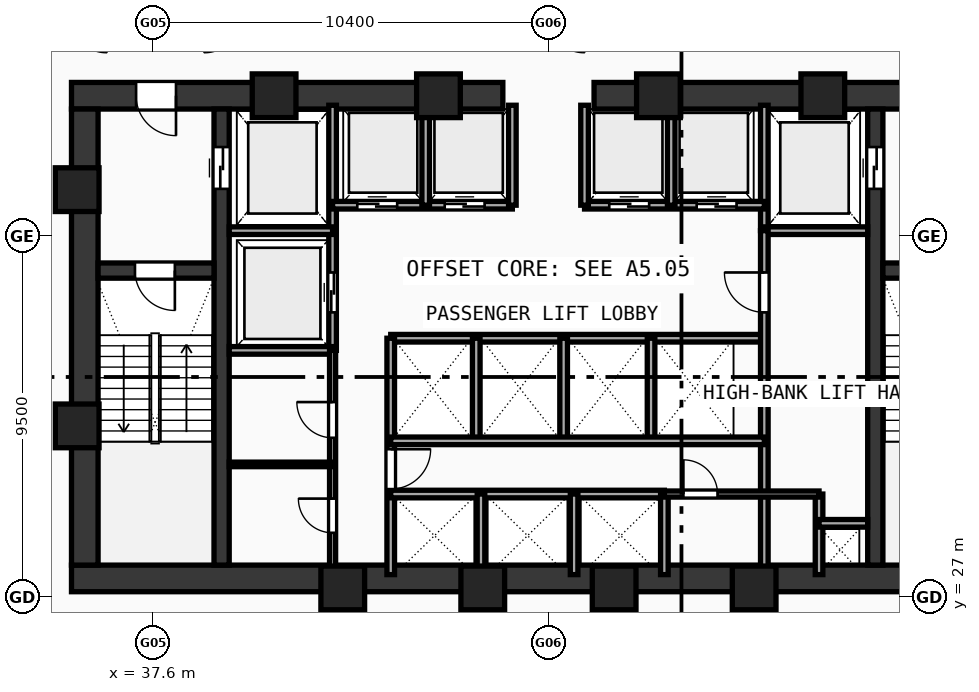
"""IFC4 building model, lengths in metres.
Left out: names, types, materials, properties, quantities, classifications, styles, units other than length and angle.
Written with IfcOpenShell. Run it as: python <this file> out.ifc"""

import sys

from ifc_helpers import new_model, si_unit, direction, frame, frame_2d, origin, origin_with_axes, origin_2d, place, context, subcontext, project, spatial, rectangle, hollow_rectangle, extrude, source, transform, mapped, element, fill, save


model = new_model("IFC4")
c1 = context("Model", 3, precision=1e-05, world=origin(), true_north=direction((0.0, 1.0)))
c2 = subcontext(c1, "Body", "Model", "MODEL_VIEW")
j1 = project(units=[si_unit("LENGTHUNIT", "METRE"), si_unit("PLANEANGLEUNIT", "RADIAN")], contexts=[c1])
p1 = place(None, origin())
s1 = spatial("IfcSite", under=j1, at=p1, CompositionType="ELEMENT")
p2 = place(p1, origin())
s2 = spatial("IfcBuilding", under=s1, at=p2, CompositionType="ELEMENT")
p3 = place(p2, frame((0.0, 0.0, 48.55)))
s3 = spatial("IfcBuildingStorey", under=s2, at=p3, CompositionType="ELEMENT", Elevation=48.55)
p4 = place(p3, frame((35.45, 27.5, 0.0), z_axis=(0.0, 0.0, 1.0), x_axis=(1.0, 0.0, 0.0)))
e1 = element("IfcWall", 1, at=p4, inside=s3, PredefinedType="SHEAR", context=c2, shape_type="SweptSolid", body=[
    extrude(rectangle(XDim=25.1, YDim=0.7, at=frame_2d((12.55, 0.0))), origin(), (0.0, 0.0, 1.0), 3.37),
])
p5 = place(p3, frame((35.45, 40.2, 0.0), z_axis=(0.0, 0.0, 1.0), x_axis=(1.0, 0.0, 0.0)))
e2 = element("IfcWall", 2, at=p5, inside=s3, PredefinedType="SHEAR", context=c2, shape_type="SweptSolid", body=[
    extrude(rectangle(XDim=11.35, YDim=0.7, at=frame_2d((5.675, 0.0))), origin(), (0.0, 0.0, 1.0), 3.37),
])
p6 = place(p5, frame((1.7, 0.0, 0.0)))
e3 = element("IfcOpeningElement", 3, at=p6, cuts=e2, PredefinedType="OPENING", context=c2, shape_type="SweptSolid", body=[
    extrude(rectangle(XDim=1.05, YDim=2.1, at=frame_2d((0.525, 1.05))), frame((0.0, 0.36, 0.0), z_axis=(0.0, -1.0, 0.0), x_axis=(1.0, 0.0, 0.0)), (0.0, 0.0, 1.0), 0.72),
])
p7 = place(p3, frame((49.2, 40.2, 0.0), z_axis=(0.0, 0.0, 1.0), x_axis=(1.0, 0.0, 0.0)))
e4 = element("IfcWall", 4, at=p7, inside=s3, PredefinedType="SHEAR", context=c2, shape_type="SweptSolid", body=[
    extrude(rectangle(XDim=11.35, YDim=0.7, at=frame_2d((5.675, 0.0))), origin(), (0.0, 0.0, 1.0), 3.37),
])
p8 = place(p7, frame((8.6, 0.0, 0.0)))
e5 = element("IfcOpeningElement", 5, at=p8, cuts=e4, PredefinedType="OPENING", context=c2, shape_type="SweptSolid", body=[
    extrude(rectangle(XDim=1.05, YDim=2.1, at=frame_2d((0.525, 1.05))), frame((0.0, 0.36, 0.0), z_axis=(0.0, -1.0, 0.0), x_axis=(1.0, 0.0, 0.0)), (0.0, 0.0, 1.0), 0.72),
])
p9 = place(p3, frame((35.8, 27.85, 0.0), z_axis=(0.0, 0.0, 1.0), x_axis=(0.0, 1.0, 0.0)))
e6 = element("IfcWall", 6, at=p9, inside=s3, PredefinedType="SHEAR", context=c2, shape_type="SweptSolid", body=[
    extrude(rectangle(XDim=12.0, YDim=0.7, at=frame_2d((6.0, 0.0))), origin(), (0.0, 0.0, 1.0), 3.37),
])
p10 = place(p3, frame((39.4, 27.85, 0.0), z_axis=(0.0, 0.0, 1.0), x_axis=(0.0, 1.0, 0.0)))
e7 = element("IfcWall", 7, at=p10, inside=s3, PredefinedType="SHEAR", context=c2, shape_type="SweptSolid", body=[
    extrude(rectangle(XDim=12.0, YDim=0.4, at=frame_2d((6.0, 0.0))), origin(), (0.0, 0.0, 1.0), 3.37),
])
p11 = place(p10, frame((9.9, 0.0, 0.0)))
e8 = element("IfcOpeningElement", 8, at=p11, cuts=e7, PredefinedType="OPENING", context=c2, shape_type="SweptSolid", body=[
    extrude(rectangle(XDim=1.1, YDim=2.1, at=frame_2d((0.55, 1.05))), frame((0.0, 0.21, 0.0), z_axis=(0.0, -1.0, 0.0), x_axis=(1.0, 0.0, 0.0)), (0.0, 0.0, 1.0), 0.42),
])
p12 = place(p3, frame((56.6, 27.85, 0.0), z_axis=(0.0, 0.0, 1.0), x_axis=(0.0, 1.0, 0.0)))
e9 = element("IfcWall", 9, at=p12, inside=s3, PredefinedType="SHEAR", context=c2, shape_type="SweptSolid", body=[
    extrude(rectangle(XDim=12.0, YDim=0.4, at=frame_2d((6.0, 0.0))), origin(), (0.0, 0.0, 1.0), 3.37),
])
p13 = place(p12, frame((9.9, 0.0, 0.0)))
e10 = element("IfcOpeningElement", 10, at=p13, cuts=e9, PredefinedType="OPENING", context=c2, shape_type="SweptSolid", body=[
    extrude(rectangle(XDim=1.1, YDim=2.1, at=frame_2d((0.55, 1.05))), frame((0.0, 0.21, 0.0), z_axis=(0.0, -1.0, 0.0), x_axis=(1.0, 0.0, 0.0)), (0.0, 0.0, 1.0), 0.42),
])
p14 = place(p3, frame((36.15, 35.6, 0.0), z_axis=(0.0, 0.0, 1.0), x_axis=(1.0, 0.0, 0.0)))
e11 = element("IfcWall", 11, at=p14, inside=s3, PredefinedType="SHEAR", context=c2, shape_type="SweptSolid", body=[
    extrude(rectangle(XDim=3.05, YDim=0.4, at=frame_2d((1.525, 0.0))), origin(), (0.0, 0.0, 1.0), 3.37),
])
p15 = place(p14, frame((0.97, 0.0, 0.0)))
e12 = element("IfcOpeningElement", 12, at=p15, cuts=e11, PredefinedType="OPENING", context=c2, shape_type="SweptSolid", body=[
    extrude(rectangle(XDim=1.05, YDim=2.1, at=frame_2d((0.525, 1.05))), frame((0.0, 0.21, 0.0), z_axis=(0.0, -1.0, 0.0), x_axis=(1.0, 0.0, 0.0)), (0.0, 0.0, 1.0), 0.42),
])
p16 = place(p3, frame((56.8, 35.6, 0.0), z_axis=(0.0, 0.0, 1.0), x_axis=(1.0, 0.0, 0.0)))
e13 = element("IfcWall", 13, at=p16, inside=s3, PredefinedType="SHEAR", context=c2, shape_type="SweptSolid", body=[
    extrude(rectangle(XDim=3.05, YDim=0.4, at=frame_2d((1.525, 0.0))), origin(), (0.0, 0.0, 1.0), 3.37),
])
p17 = place(p16, frame((1.02, 0.0, 0.0)))
e14 = element("IfcOpeningElement", 14, at=p17, cuts=e13, PredefinedType="OPENING", context=c2, shape_type="SweptSolid", body=[
    extrude(rectangle(XDim=1.05, YDim=2.1, at=frame_2d((0.525, 1.05))), frame((0.0, 0.21, 0.0), z_axis=(0.0, -1.0, 0.0), x_axis=(1.0, 0.0, 0.0)), (0.0, 0.0, 1.0), 0.42),
])
m1 = source(origin(), c2, "Body", "SweptSolid", [
    extrude(hollow_rectangle(XDim=1.15, YDim=1.15, WallThickness=0.048, at=origin_2d()), origin(), (0.0, 0.0, 1.0), 3.63),
])
for number, where, z_axis, x_axis in (
    (15, (42.588, 27.25, -0.26), (0.0, 0.0, 1.0), (1.0, 0.0, 0.0)),
    (16, (46.272, 27.25, -0.26), (0.0, 0.0, 1.0), (1.0, 0.0, 0.0)),
    (17, (49.729, 27.25, -0.26), (0.0, 0.0, 1.0), (1.0, 0.0, 0.0)),
    (18, (53.412, 27.25, -0.26), (0.0, 0.0, 1.0), (1.0, 0.0, 0.0)),
    (19, (55.219, 40.2, -0.26), (0.0, 0.0, 1.0), (1.0, 0.0, 0.0)),
    (20, (50.894, 40.2, -0.26), (0.0, 0.0, 1.0), (1.0, 0.0, 0.0)),
    (21, (45.106, 40.2, -0.26), (0.0, 0.0, 1.0), (1.0, 0.0, 0.0)),
    (22, (40.781, 40.2, -0.26), (0.0, 0.0, 1.0), (1.0, 0.0, 0.0)),
    (23, (35.6, 37.729, -0.26), (0.0, 0.0, 1.0), (1.0, 0.0, 0.0)),
    (24, (35.6, 31.513, -0.26), (0.0, 0.0, 1.0), (1.0, 0.0, 0.0)),
):
    element("IfcColumn", number, at=place(p3, frame(where, z_axis=z_axis, x_axis=x_axis)), inside=s3, PredefinedType="COLUMN", context=c2, shape_type="MappedRepresentation", body=[
        mapped(m1, transform((0.0, 0.0, 0.0), scale=1.0)),
    ])
p18 = place(p3, frame((42.32, 33.5, 0.0), z_axis=(0.0, 0.0, 1.0), x_axis=(0.0, 1.0, 0.0)))
e25 = element("IfcWall", 25, at=p18, inside=s3, PredefinedType="SOLIDWALL", context=c2, shape_type="SweptSolid", body=[
    extrude(rectangle(XDim=6.45, YDim=0.2, at=frame_2d((3.225, 0.0))), origin(), (0.0, 0.0, 1.0), 3.37),
])
p19 = place(p18, frame((1.0, 0.0, 0.0)))
e26 = element("IfcOpeningElement", 26, at=p19, cuts=e25, PredefinedType="OPENING", context=c2, shape_type="SweptSolid", body=[
    extrude(rectangle(XDim=1.05, YDim=2.1, at=frame_2d((0.525, 1.05))), frame((0.0, 0.11, 0.0), z_axis=(0.0, -1.0, 0.0), x_axis=(1.0, 0.0, 0.0)), (0.0, 0.0, 1.0), 0.22),
])
for number, where, z_axis, x_axis in (
    (27, (39.6, 36.65, 0.0), (0.0, 0.0, 1.0), (1.0, 0.0, 0.0)),
    (28, (39.6, 33.5, 0.0), (0.0, 0.0, 1.0), (1.0, 0.0, 0.0)),
):
    element("IfcWall", number, at=place(p3, frame(where, z_axis=z_axis, x_axis=x_axis)), inside=s3, PredefinedType="SOLIDWALL", context=c2, shape_type="SweptSolid", body=[
        extrude(rectangle(XDim=2.72, YDim=0.2, at=frame_2d((1.36, 0.0))), origin(), (0.0, 0.0, 1.0), 3.37),
    ])
p20 = place(p3, frame((53.68, 36.65, 0.0), z_axis=(0.0, 0.0, 1.0), x_axis=(0.0, 1.0, 0.0)))
e29 = element("IfcWall", 29, at=p20, inside=s3, PredefinedType="SOLIDWALL", context=c2, shape_type="SweptSolid", body=[
    extrude(rectangle(XDim=3.3, YDim=0.2, at=frame_2d((1.65, 0.0))), origin(), (0.0, 0.0, 1.0), 3.37),
])
p21 = place(p3, frame((53.68, 36.65, 0.0), z_axis=(0.0, 0.0, 1.0), x_axis=(1.0, 0.0, 0.0)))
e30 = element("IfcWall", 30, at=p21, inside=s3, PredefinedType="SOLIDWALL", context=c2, shape_type="SweptSolid", body=[
    extrude(rectangle(XDim=2.72, YDim=0.2, at=frame_2d((1.36, 0.0))), origin(), (0.0, 0.0, 1.0), 3.37),
])
p22 = place(p3, frame((42.32, 37.32, 0.0), z_axis=(0.0, 0.0, 1.0), x_axis=(1.0, 0.0, 0.0)))
e31 = element("IfcWall", 31, at=p22, inside=s3, PredefinedType="SOLIDWALL", context=c2, shape_type="SweptSolid", body=[
    extrude(rectangle(XDim=4.73, YDim=0.2, at=frame_2d((2.365, 0.0))), origin(), (0.0, 0.0, 1.0), 3.37),
])
p23 = place(p22, frame((0.65, 0.0, 0.0)))
e32 = element("IfcOpeningElement", 32, at=p23, cuts=e31, PredefinedType="OPENING", context=c2, shape_type="SweptSolid", body=[
    extrude(rectangle(XDim=1.05, YDim=2.1, at=frame_2d((0.525, 1.05))), frame((0.0, 0.11, 0.0), z_axis=(0.0, -1.0, 0.0), x_axis=(1.0, 0.0, 0.0)), (0.0, 0.0, 1.0), 0.22),
])
p24 = place(p22, frame((2.95, 0.0, 0.0)))
e33 = element("IfcOpeningElement", 33, at=p24, cuts=e31, PredefinedType="OPENING", context=c2, shape_type="SweptSolid", body=[
    extrude(rectangle(XDim=1.05, YDim=2.1, at=frame_2d((0.525, 1.05))), frame((0.0, 0.11, 0.0), z_axis=(0.0, -1.0, 0.0), x_axis=(1.0, 0.0, 0.0)), (0.0, 0.0, 1.0), 0.22),
])
p25 = place(p3, frame((48.95, 37.32, 0.0), z_axis=(0.0, 0.0, 1.0), x_axis=(1.0, 0.0, 0.0)))
e34 = element("IfcWall", 34, at=p25, inside=s3, PredefinedType="SOLIDWALL", context=c2, shape_type="SweptSolid", body=[
    extrude(rectangle(XDim=4.73, YDim=0.2, at=frame_2d((2.365, 0.0))), origin(), (0.0, 0.0, 1.0), 3.37),
])
p26 = place(p25, frame((0.65, 0.0, 0.0)))
e35 = element("IfcOpeningElement", 35, at=p26, cuts=e34, PredefinedType="OPENING", context=c2, shape_type="SweptSolid", body=[
    extrude(rectangle(XDim=1.05, YDim=2.1, at=frame_2d((0.525, 1.05))), frame((0.0, 0.11, 0.0), z_axis=(0.0, -1.0, 0.0), x_axis=(1.0, 0.0, 0.0)), (0.0, 0.0, 1.0), 0.22),
])
p27 = place(p25, frame((2.95, 0.0, 0.0)))
e36 = element("IfcOpeningElement", 36, at=p27, cuts=e34, PredefinedType="OPENING", context=c2, shape_type="SweptSolid", body=[
    extrude(rectangle(XDim=1.05, YDim=2.1, at=frame_2d((0.525, 1.05))), frame((0.0, 0.11, 0.0), z_axis=(0.0, -1.0, 0.0), x_axis=(1.0, 0.0, 0.0)), (0.0, 0.0, 1.0), 0.22),
])
for number, where, z_axis, x_axis in (
    (37, (47.05, 37.32, 0.0), (0.0, 0.0, 1.0), (0.0, 1.0, 0.0)),
    (38, (48.95, 37.32, 0.0), (0.0, 0.0, 1.0), (0.0, 1.0, 0.0)),
    (39, (44.77, 37.32, 0.0), (0.0, 0.0, 1.0), (0.0, 1.0, 0.0)),
    (40, (51.23, 37.32, 0.0), (0.0, 0.0, 1.0), (0.0, 1.0, 0.0)),
):
    element("IfcWall", number, at=place(p3, frame(where, z_axis=z_axis, x_axis=x_axis)), inside=s3, PredefinedType="SOLIDWALL", context=c2, shape_type="SweptSolid", body=[
        extrude(rectangle(XDim=2.63, YDim=0.2, at=frame_2d((1.315, 0.0))), origin(), (0.0, 0.0, 1.0), 3.37),
    ])
p28 = place(p3, frame((43.85, 33.82, 0.0), z_axis=(0.0, 0.0, 1.0), x_axis=(1.0, 0.0, 0.0)))
e41 = element("IfcWall", 41, at=p28, inside=s3, PredefinedType="SOLIDWALL", context=c2, shape_type="SweptSolid", body=[
    extrude(rectangle(XDim=9.83, YDim=0.2, at=frame_2d((4.915, 0.0))), origin(), (0.0, 0.0, 1.0), 3.37),
])
p29 = place(p3, frame((43.85, 27.6, 0.0), z_axis=(0.0, 0.0, 1.0), x_axis=(0.0, 1.0, 0.0)))
e42 = element("IfcWall", 42, at=p29, inside=s3, PredefinedType="SOLIDWALL", context=c2, shape_type="SweptSolid", body=[
    extrude(rectangle(XDim=6.22, YDim=0.2, at=frame_2d((3.11, 0.0))), origin(), (0.0, 0.0, 1.0), 3.37),
])
p30 = place(p29, frame((2.25, 0.0, 0.0)))
e43 = element("IfcOpeningElement", 43, at=p30, cuts=e42, PredefinedType="OPENING", context=c2, shape_type="SweptSolid", body=[
    extrude(rectangle(XDim=1.05, YDim=2.1, at=frame_2d((0.525, 1.05))), frame((0.0, 0.11, 0.0), z_axis=(0.0, -1.0, 0.0), x_axis=(1.0, 0.0, 0.0)), (0.0, 0.0, 1.0), 0.22),
])
p31 = place(p3, frame((53.68, 27.6, 0.0), z_axis=(0.0, 0.0, 1.0), x_axis=(0.0, 1.0, 0.0)))
e44 = element("IfcWall", 44, at=p31, inside=s3, PredefinedType="SOLIDWALL", context=c2, shape_type="SweptSolid", body=[
    extrude(rectangle(XDim=9.05, YDim=0.2, at=frame_2d((4.525, 0.0))), origin(), (0.0, 0.0, 1.0), 3.37),
])
p32 = place(p31, frame((6.9, 0.0, 0.0)))
e45 = element("IfcOpeningElement", 45, at=p32, cuts=e44, PredefinedType="OPENING", context=c2, shape_type="SweptSolid", body=[
    extrude(rectangle(XDim=1.05, YDim=2.1, at=frame_2d((0.525, 1.05))), frame((0.0, 0.11, 0.0), z_axis=(0.0, -1.0, 0.0), x_axis=(1.0, 0.0, 0.0)), (0.0, 0.0, 1.0), 0.22),
])
for number, where, z_axis, x_axis in (
    (46, (46.1, 31.12, 0.0), (0.0, 0.0, 1.0), (0.0, 1.0, 0.0)),
    (47, (48.4, 31.12, 0.0), (0.0, 0.0, 1.0), (0.0, 1.0, 0.0)),
    (48, (50.7, 31.12, 0.0), (0.0, 0.0, 1.0), (0.0, 1.0, 0.0)),
):
    element("IfcWall", number, at=place(p3, frame(where, z_axis=z_axis, x_axis=x_axis)), inside=s3, PredefinedType="SOLIDWALL", context=c2, shape_type="SweptSolid", body=[
        extrude(rectangle(XDim=2.7, YDim=0.2, at=frame_2d((1.35, 0.0))), origin(), (0.0, 0.0, 1.0), 3.37),
    ])
p33 = place(p3, frame((43.85, 29.72, 0.0), z_axis=(0.0, 0.0, 1.0), x_axis=(1.0, 0.0, 0.0)))
e49 = element("IfcWall", 49, at=p33, inside=s3, PredefinedType="SOLIDWALL", context=c2, shape_type="SweptSolid", body=[
    extrude(rectangle(XDim=7.2, YDim=0.2, at=frame_2d((3.6, 0.0))), origin(), (0.0, 0.0, 1.0), 3.37),
])
p34 = place(p3, frame((51.05, 27.6, 0.0), z_axis=(0.0, 0.0, 1.0), x_axis=(0.0, 1.0, 0.0)))
e50 = element("IfcWall", 50, at=p34, inside=s3, PredefinedType="SOLIDWALL", context=c2, shape_type="SweptSolid", body=[
    extrude(rectangle(XDim=2.12, YDim=0.2, at=frame_2d((1.06, 0.0))), origin(), (0.0, 0.0, 1.0), 3.37),
])
p35 = place(p3, frame((43.85, 31.12, 0.0), z_axis=(0.0, 0.0, 1.0), x_axis=(1.0, 0.0, 0.0)))
e51 = element("IfcWall", 51, at=p35, inside=s3, PredefinedType="SOLIDWALL", context=c2, shape_type="SweptSolid", body=[
    extrude(rectangle(XDim=9.83, YDim=0.2, at=frame_2d((4.915, 0.0))), origin(), (0.0, 0.0, 1.0), 3.37),
])
for number, where, z_axis, x_axis in (
    (52, (46.225, 27.6, 0.0), (0.0, 0.0, 1.0), (0.0, 1.0, 0.0)),
    (53, (48.675, 27.6, 0.0), (0.0, 0.0, 1.0), (0.0, 1.0, 0.0)),
    (54, (55.12, 27.6, 0.0), (0.0, 0.0, 1.0), (0.0, 1.0, 0.0)),
):
    element("IfcWall", number, at=place(p3, frame(where, z_axis=z_axis, x_axis=x_axis)), inside=s3, PredefinedType="SOLIDWALL", context=c2, shape_type="SweptSolid", body=[
        extrude(rectangle(XDim=2.12, YDim=0.2, at=frame_2d((1.06, 0.0))), origin(), (0.0, 0.0, 1.0), 3.37),
    ])
p36 = place(p3, frame((55.12, 28.95, 0.0), z_axis=(0.0, 0.0, 1.0), x_axis=(1.0, 0.0, 0.0)))
e55 = element("IfcWall", 55, at=p36, inside=s3, PredefinedType="SOLIDWALL", context=c2, shape_type="SweptSolid", body=[
    extrude(rectangle(XDim=1.28, YDim=0.2, at=frame_2d((0.64, 0.0))), origin(), (0.0, 0.0, 1.0), 3.37),
])
p37 = place(p3, frame((42.32, 27.6, 0.0), z_axis=(0.0, 0.0, 1.0), x_axis=(0.0, 1.0, 0.0)))
e56 = element("IfcWall", 56, at=p37, inside=s3, PredefinedType="PARTITIONING", context=c2, shape_type="SweptSolid", body=[
    extrude(rectangle(XDim=5.9, YDim=0.16, at=frame_2d((2.95, 0.0))), origin(), (0.0, 0.0, 1.0), 3.37),
])
p38 = place(p37, frame((1.1, 0.0, 0.0)))
e57 = element("IfcOpeningElement", 57, at=p38, cuts=e56, PredefinedType="OPENING", context=c2, shape_type="SweptSolid", body=[
    extrude(rectangle(XDim=0.9, YDim=2.1, at=frame_2d((0.45, 1.05))), frame((0.0, 0.09, 0.0), z_axis=(0.0, -1.0, 0.0), x_axis=(1.0, 0.0, 0.0)), (0.0, 0.0, 1.0), 0.18),
])
p39 = place(p37, frame((3.6, 0.0, 0.0)))
e58 = element("IfcOpeningElement", 58, at=p39, cuts=e56, PredefinedType="OPENING", context=c2, shape_type="SweptSolid", body=[
    extrude(rectangle(XDim=0.94, YDim=2.1, at=frame_2d((0.47, 1.05))), frame((0.0, 0.09, 0.0), z_axis=(0.0, -1.0, 0.0), x_axis=(1.0, 0.0, 0.0)), (0.0, 0.0, 1.0), 0.18),
])
p40 = place(p3, frame((51.05, 29.72, 0.0), z_axis=(0.0, 0.0, 1.0), x_axis=(1.0, 0.0, 0.0)))
e59 = element("IfcWall", 59, at=p40, inside=s3, PredefinedType="PARTITIONING", context=c2, shape_type="SweptSolid", body=[
    extrude(rectangle(XDim=4.07, YDim=0.16, at=frame_2d((2.035, 0.0))), origin(), (0.0, 0.0, 1.0), 3.37),
])
p41 = place(p40, frame((0.5, 0.0, 0.0)))
e60 = element("IfcOpeningElement", 60, at=p41, cuts=e59, PredefinedType="OPENING", context=c2, shape_type="SweptSolid", body=[
    extrude(rectangle(XDim=0.9, YDim=2.1, at=frame_2d((0.45, 1.05))), frame((0.0, 0.09, 0.0), z_axis=(0.0, -1.0, 0.0), x_axis=(1.0, 0.0, 0.0)), (0.0, 0.0, 1.0), 0.18),
])
p42 = place(p3, frame((39.6, 30.5, 0.0), z_axis=(0.0, 0.0, 1.0), x_axis=(1.0, 0.0, 0.0)))
e61 = element("IfcWall", 61, at=p42, inside=s3, PredefinedType="PARTITIONING", context=c2, shape_type="SweptSolid", body=[
    extrude(rectangle(XDim=2.72, YDim=0.12, at=frame_2d((1.36, 0.0))), origin(), (0.0, 0.0, 1.0), 3.37),
])
m2 = source(origin(), c2, "Body", "SweptSolid", [
    extrude(rectangle(XDim=1.05, YDim=2.1, at=frame_2d((0.525, 1.05))), frame((0.0, 0.025, 0.0), z_axis=(0.0, -1.0, 0.0), x_axis=(1.0, 0.0, 0.0)), (0.0, 0.0, 1.0), 0.05),
])
p43 = place(p15, frame((1.05, 0.0, 0.0), z_axis=(0.0, 0.0, 1.0), x_axis=(-1.0, 0.0, 0.0)))
e62 = element("IfcDoor", 62, at=p43, inside=s3, OperationType="SINGLE_SWING_LEFT", PredefinedType="DOOR", context=c2, shape_type="MappedRepresentation", body=[
    mapped(m2, transform((0.0, 0.0, 0.0), scale=1.0)),
])
fill(e12, e62)
p44 = place(p6, frame((1.05, 0.0, 0.0), z_axis=(0.0, 0.0, 1.0), x_axis=(-1.0, 0.0, 0.0)))
e63 = element("IfcDoor", 63, at=p44, inside=s3, OperationType="SINGLE_SWING_LEFT", PredefinedType="DOOR", context=c2, shape_type="MappedRepresentation", body=[
    mapped(m2, transform((0.0, 0.0, 0.0), scale=1.0)),
])
fill(e3, e63)
m3 = source(origin(), c2, "Body", "SweptSolid", [
    extrude(rectangle(XDim=1.1, YDim=2.1, at=frame_2d((0.55, 1.05))), frame((0.0, 0.025, 0.0), z_axis=(0.0, -1.0, 0.0), x_axis=(1.0, 0.0, 0.0)), (0.0, 0.0, 1.0), 0.05),
])
p45 = place(p11, frame((1.1, 0.0, 0.0), z_axis=(0.0, 0.0, 1.0), x_axis=(-1.0, 0.0, 0.0)))
e64 = element("IfcDoor", 64, at=p45, inside=s3, OperationType="DOUBLE_DOOR_SLIDING", PredefinedType="DOOR", context=c2, shape_type="MappedRepresentation", body=[
    mapped(m3, transform((0.0, 0.0, 0.0), scale=1.0)),
])
fill(e8, e64)
p46 = place(p13, origin_with_axes())
e65 = element("IfcDoor", 65, at=p46, inside=s3, OperationType="DOUBLE_DOOR_SLIDING", PredefinedType="DOOR", context=c2, shape_type="MappedRepresentation", body=[
    mapped(m3, transform((0.0, 0.0, 0.0), scale=1.0)),
])
fill(e10, e65)
p47 = place(p19, origin_with_axes())
e66 = element("IfcDoor", 66, at=p47, inside=s3, OperationType="DOUBLE_DOOR_SLIDING", PredefinedType="DOOR", context=c2, shape_type="MappedRepresentation", body=[
    mapped(m2, transform((0.0, 0.0, 0.0), scale=1.0)),
])
fill(e26, e66)
p48 = place(p23, frame((1.05, 0.0, 0.0), z_axis=(0.0, 0.0, 1.0), x_axis=(-1.0, 0.0, 0.0)))
e67 = element("IfcDoor", 67, at=p48, inside=s3, OperationType="DOUBLE_DOOR_SLIDING", PredefinedType="DOOR", context=c2, shape_type="MappedRepresentation", body=[
    mapped(m2, transform((0.0, 0.0, 0.0), scale=1.0)),
])
fill(e32, e67)
p49 = place(p24, frame((1.05, 0.0, 0.0), z_axis=(0.0, 0.0, 1.0), x_axis=(-1.0, 0.0, 0.0)))
e68 = element("IfcDoor", 68, at=p49, inside=s3, OperationType="DOUBLE_DOOR_SLIDING", PredefinedType="DOOR", context=c2, shape_type="MappedRepresentation", body=[
    mapped(m2, transform((0.0, 0.0, 0.0), scale=1.0)),
])
fill(e33, e68)
p50 = place(p26, frame((1.05, 0.0, 0.0), z_axis=(0.0, 0.0, 1.0), x_axis=(-1.0, 0.0, 0.0)))
e69 = element("IfcDoor", 69, at=p50, inside=s3, OperationType="DOUBLE_DOOR_SLIDING", PredefinedType="DOOR", context=c2, shape_type="MappedRepresentation", body=[
    mapped(m2, transform((0.0, 0.0, 0.0), scale=1.0)),
])
fill(e35, e69)
p51 = place(p27, frame((1.05, 0.0, 0.0), z_axis=(0.0, 0.0, 1.0), x_axis=(-1.0, 0.0, 0.0)))
e70 = element("IfcDoor", 70, at=p51, inside=s3, OperationType="DOUBLE_DOOR_SLIDING", PredefinedType="DOOR", context=c2, shape_type="MappedRepresentation", body=[
    mapped(m2, transform((0.0, 0.0, 0.0), scale=1.0)),
])
fill(e36, e70)
p52 = place(p30, frame((1.05, 0.0, 0.0), z_axis=(0.0, 0.0, 1.0), x_axis=(-1.0, 0.0, 0.0)))
e71 = element("IfcDoor", 71, at=p52, inside=s3, OperationType="SINGLE_SWING_LEFT", PredefinedType="DOOR", context=c2, shape_type="MappedRepresentation", body=[
    mapped(m2, transform((0.0, 0.0, 0.0), scale=1.0)),
])
fill(e43, e71)
p53 = place(p32, origin_with_axes())
e72 = element("IfcDoor", 72, at=p53, inside=s3, OperationType="SINGLE_SWING_RIGHT", PredefinedType="DOOR", context=c2, shape_type="MappedRepresentation", body=[
    mapped(m2, transform((0.0, 0.0, 0.0), scale=1.0)),
])
fill(e45, e72)
m4 = source(origin(), c2, "Body", "SweptSolid", [
    extrude(rectangle(XDim=0.9, YDim=2.1, at=frame_2d((0.45, 1.05))), frame((0.0, 0.025, 0.0), z_axis=(0.0, -1.0, 0.0), x_axis=(1.0, 0.0, 0.0)), (0.0, 0.0, 1.0), 0.05),
])
p54 = place(p38, origin_with_axes())
e73 = element("IfcDoor", 73, at=p54, inside=s3, OperationType="SINGLE_SWING_RIGHT", PredefinedType="DOOR", context=c2, shape_type="MappedRepresentation", body=[
    mapped(m4, transform((0.0, 0.0, 0.0), scale=1.0)),
])
fill(e57, e73)
m5 = source(origin(), c2, "Body", "SweptSolid", [
    extrude(rectangle(XDim=0.94, YDim=2.1, at=frame_2d((0.47, 1.05))), frame((0.0, 0.025, 0.0), z_axis=(0.0, -1.0, 0.0), x_axis=(1.0, 0.0, 0.0)), (0.0, 0.0, 1.0), 0.05),
])
p55 = place(p39, origin_with_axes())
e74 = element("IfcDoor", 74, at=p55, inside=s3, OperationType="SINGLE_SWING_RIGHT", PredefinedType="DOOR", context=c2, shape_type="MappedRepresentation", body=[
    mapped(m5, transform((0.0, 0.0, 0.0), scale=1.0)),
])
fill(e58, e74)
p56 = place(p41, origin_with_axes())
e75 = element("IfcDoor", 75, at=p56, inside=s3, OperationType="SINGLE_SWING_LEFT", PredefinedType="DOOR", context=c2, shape_type="MappedRepresentation", body=[
    mapped(m4, transform((0.0, 0.0, 0.0), scale=1.0)),
])
fill(e60, e75)
save(model, sys.argv[1])
